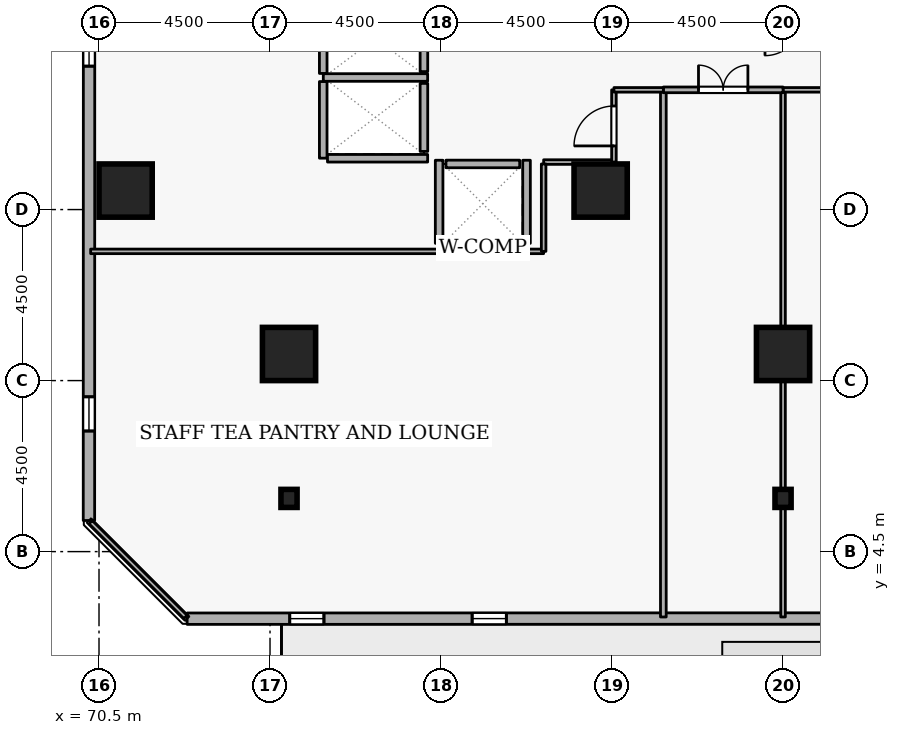
"""IFC4 building model, lengths in metres.
Left out: names, types, materials, properties, quantities, classifications, styles, units other than length and angle.
Written with IfcOpenShell. Run it as: python <this file> out.ifc"""

import sys

from ifc_helpers import new_model, si_unit, direction, frame, frame_2d, origin, origin_2d, place, context, subcontext, project, spatial, rectangle, i_section, extrude, element, fill, save


model = new_model("IFC4")
c1 = context("Model", 3, precision=1e-05, world=origin(), true_north=direction((0.0, 1.0)))
c2 = subcontext(c1, "Body", "Model", "MODEL_VIEW")
j1 = project(units=[si_unit("LENGTHUNIT", "METRE"), si_unit("PLANEANGLEUNIT", "RADIAN")], contexts=[c1])
p1 = place(None, origin())
s1 = spatial("IfcSite", under=j1, at=p1, CompositionType="ELEMENT")
p2 = place(p1, origin())
s2 = spatial("IfcBuilding", under=s1, at=p2, CompositionType="ELEMENT")
p3 = place(p2, frame((0.0, 0.0, 38.7)))
s3 = spatial("IfcBuildingStorey", under=s2, at=p3, CompositionType="ELEMENT", Elevation=38.7)
for number, where, z_axis, x_axis in (
    (1, (71.2, 14.0, 0.0), (0.0, 0.0, 1.0), (1.0, 0.0, 0.0)),
    (2, (88.5, 9.7, 0.0), (0.0, 0.0, 1.0), (1.0, 0.0, 0.0)),
    (3, (75.5, 9.7, 0.0), (0.0, 0.0, 1.0), (1.0, 0.0, 0.0)),
    (4, (83.7, 14.0, 0.0), (0.0, 0.0, 1.0), (1.0, 0.0, 0.0)),
):
    element("IfcColumn", number, at=place(p3, frame(where, z_axis=z_axis, x_axis=x_axis)), inside=s3, PredefinedType="COLUMN", context=c2, shape_type="SweptSolid", body=[
        extrude(rectangle(XDim=1.4, YDim=1.4, at=origin_2d()), origin(), (0.0, 0.0, 1.0), 3.6),
    ])
for number, where, z_axis, x_axis in (
    (5, (88.5, 5.9, 0.0), (0.0, 0.0, 1.0), (1.0, 0.0, 0.0)),
    (6, (75.5, 5.9, 0.0), (0.0, 0.0, 1.0), (1.0, 0.0, 0.0)),
):
    element("IfcColumn", number, at=place(p3, frame(where, z_axis=z_axis, x_axis=x_axis)), inside=s3, PredefinedType="COLUMN", context=c2, shape_type="SweptSolid", body=[
        extrude(i_section(OverallWidth=0.424, OverallDepth=0.475, WebThickness=0.048, FlangeThickness=0.077, FilletRadius=0.015, at=origin_2d()), origin(), (0.0, 0.0, 1.0), 3.6),
    ])
p4 = place(p3, frame((72.819, 2.735, 0.0), z_axis=(0.0, 0.0, 1.0), x_axis=(0.999999969775, 0.000245864205, 0.0)))
e7 = element("IfcWall", 7, at=p4, inside=s3, PredefinedType="STANDARD", context=c2, shape_type="SweptSolid", body=[
    extrude(rectangle(XDim=34.755, YDim=0.3, at=frame_2d((17.377, 0.0))), origin(), (0.0, 0.0, 1.0), 2.7),
])
p5 = place(p4, frame((19.177, 0.0, 0.0)))
e8 = element("IfcOpeningElement", 8, at=p5, cuts=e7, PredefinedType="OPENING", context=c2, shape_type="SweptSolid", body=[
    extrude(rectangle(XDim=1.0, YDim=2.08, at=frame_2d((0.5, 1.04))), frame((0.0, 0.16, 0.0), z_axis=(0.0, -1.0, 0.0), x_axis=(1.0, 0.0, 0.0)), (0.0, 0.0, 1.0), 0.32),
])
p6 = place(p4, frame((2.7, 0.0, 0.72)))
e9 = element("IfcOpeningElement", 9, at=p6, cuts=e7, PredefinedType="OPENING", context=c2, shape_type="SweptSolid", body=[
    extrude(rectangle(XDim=0.9, YDim=1.75, at=frame_2d((0.45, 0.875))), frame((0.0, 0.16, 0.0), z_axis=(0.0, -1.0, 0.0), x_axis=(1.0, 0.0, 0.0)), (0.0, 0.0, 1.0), 0.32),
])
p7 = place(p4, frame((7.5, 0.0, 0.72)))
e10 = element("IfcOpeningElement", 10, at=p7, cuts=e7, PredefinedType="OPENING", context=c2, shape_type="SweptSolid", body=[
    extrude(rectangle(XDim=0.9, YDim=1.75, at=frame_2d((0.45, 0.875))), frame((0.0, 0.16, 0.0), z_axis=(0.0, -1.0, 0.0), x_axis=(1.0, 0.0, 0.0)), (0.0, 0.0, 1.0), 0.32),
])
p8 = place(p4, frame((17.1, 0.0, 0.72)))
e11 = element("IfcOpeningElement", 11, at=p8, cuts=e7, PredefinedType="OPENING", context=c2, shape_type="SweptSolid", body=[
    extrude(rectangle(XDim=0.9, YDim=1.75, at=frame_2d((0.45, 0.875))), frame((0.0, 0.16, 0.0), z_axis=(0.0, -1.0, 0.0), x_axis=(1.0, 0.0, 0.0)), (0.0, 0.0, 1.0), 0.32),
])
p9 = place(p4, frame((21.9, 0.0, 0.72)))
e12 = element("IfcOpeningElement", 12, at=p9, cuts=e7, PredefinedType="OPENING", context=c2, shape_type="SweptSolid", body=[
    extrude(rectangle(XDim=0.9, YDim=1.75, at=frame_2d((0.45, 0.875))), frame((0.0, 0.16, 0.0), z_axis=(0.0, -1.0, 0.0), x_axis=(1.0, 0.0, 0.0)), (0.0, 0.0, 1.0), 0.32),
])
p10 = place(p4, frame((26.7, 0.0, 0.72)))
e13 = element("IfcOpeningElement", 13, at=p10, cuts=e7, PredefinedType="OPENING", context=c2, shape_type="SweptSolid", body=[
    extrude(rectangle(XDim=0.9, YDim=1.75, at=frame_2d((0.45, 0.875))), frame((0.0, 0.16, 0.0), z_axis=(0.0, -1.0, 0.0), x_axis=(1.0, 0.0, 0.0)), (0.0, 0.0, 1.0), 0.32),
])
p11 = place(p3, frame((70.244, 40.073, 0.0), z_axis=(0.0, 0.0, 1.0), x_axis=(-0.000245864205, -0.999999969775, 0.0)))
e14 = element("IfcWall", 14, at=p11, inside=s3, PredefinedType="STANDARD", context=c2, shape_type="SweptSolid", body=[
    extrude(rectangle(XDim=34.755, YDim=0.3, at=frame_2d((17.377, 0.0))), origin(), (0.0, 0.0, 1.0), 2.7),
])
p12 = place(p11, frame((7.5, 0.0, 0.72)))
e15 = element("IfcOpeningElement", 15, at=p12, cuts=e14, PredefinedType="OPENING", context=c2, shape_type="SweptSolid", body=[
    extrude(rectangle(XDim=0.9, YDim=1.75, at=frame_2d((0.45, 0.875))), frame((0.0, 0.16, 0.0), z_axis=(0.0, -1.0, 0.0), x_axis=(1.0, 0.0, 0.0)), (0.0, 0.0, 1.0), 0.32),
])
p13 = place(p11, frame((17.1, 0.0, 0.72)))
e16 = element("IfcOpeningElement", 16, at=p13, cuts=e14, PredefinedType="OPENING", context=c2, shape_type="SweptSolid", body=[
    extrude(rectangle(XDim=0.9, YDim=1.75, at=frame_2d((0.45, 0.875))), frame((0.0, 0.16, 0.0), z_axis=(0.0, -1.0, 0.0), x_axis=(1.0, 0.0, 0.0)), (0.0, 0.0, 1.0), 0.32),
])
p14 = place(p11, frame((21.9, 0.0, 0.72)))
e17 = element("IfcOpeningElement", 17, at=p14, cuts=e14, PredefinedType="OPENING", context=c2, shape_type="SweptSolid", body=[
    extrude(rectangle(XDim=0.9, YDim=1.75, at=frame_2d((0.45, 0.875))), frame((0.0, 0.16, 0.0), z_axis=(0.0, -1.0, 0.0), x_axis=(1.0, 0.0, 0.0)), (0.0, 0.0, 1.0), 0.32),
])
p15 = place(p11, frame((31.5, 0.0, 0.72)))
e18 = element("IfcOpeningElement", 18, at=p15, cuts=e14, PredefinedType="OPENING", context=c2, shape_type="SweptSolid", body=[
    extrude(rectangle(XDim=0.9, YDim=1.75, at=frame_2d((0.45, 0.875))), frame((0.0, 0.16, 0.0), z_axis=(0.0, -1.0, 0.0), x_axis=(1.0, 0.0, 0.0)), (0.0, 0.0, 1.0), 0.32),
])
p16 = place(p3, frame((79.05, 17.13, 0.0), z_axis=(0.0, 0.0, 1.0), x_axis=(0.0, 1.0, 0.0)))
e19 = element("IfcWall", 19, at=p16, inside=s3, PredefinedType="STANDARD", context=c2, shape_type="SweptSolid", body=[
    extrude(rectangle(XDim=1.74, YDim=0.2, at=frame_2d((0.87, 0.0))), origin(), (0.0, 0.0, 1.0), 3.34),
])
p17 = place(p3, frame((79.05, 15.03, 0.0), z_axis=(0.0, 0.0, 1.0), x_axis=(0.0, 1.0, 0.0)))
e20 = element("IfcWall", 20, at=p17, inside=s3, PredefinedType="STANDARD", context=c2, shape_type="SweptSolid", body=[
    extrude(rectangle(XDim=1.79, YDim=0.2, at=frame_2d((0.895, 0.0))), origin(), (0.0, 0.0, 1.0), 3.34),
])
p18 = place(p3, frame((79.63, 14.7, 0.0), z_axis=(0.0, 0.0, 1.0), x_axis=(1.0, 0.0, 0.0)))
e21 = element("IfcWall", 21, at=p18, inside=s3, PredefinedType="STANDARD", context=c2, shape_type="SweptSolid", body=[
    extrude(rectangle(XDim=1.94, YDim=0.2, at=frame_2d((0.97, 0.0))), origin(), (0.0, 0.0, 1.0), 3.34),
])
p19 = place(p3, frame((76.402, 16.975, 0.0), z_axis=(0.0, 0.0, 1.0), x_axis=(1.0, 0.0, 0.0)))
e22 = element("IfcWall", 22, at=p19, inside=s3, PredefinedType="STANDARD", context=c2, shape_type="SweptSolid", body=[
    extrude(rectangle(XDim=2.746, YDim=0.2, at=frame_2d((1.373, 0.0))), origin(), (0.0, 0.0, 1.0), 3.34),
])
p20 = place(p3, frame((76.4, 14.852, 0.0), z_axis=(0.0, 0.0, 1.0), x_axis=(0.0, 1.0, 0.0)))
e23 = element("IfcWall", 23, at=p20, inside=s3, PredefinedType="STANDARD", context=c2, shape_type="SweptSolid", body=[
    extrude(rectangle(XDim=2.016, YDim=0.2, at=frame_2d((1.008, 0.0))), origin(), (0.0, 0.0, 1.0), 3.34),
])
p21 = place(p3, frame((76.4, 17.082, 0.0), z_axis=(0.0, 0.0, 1.0), x_axis=(0.0, 1.0, 0.0)))
e24 = element("IfcWall", 24, at=p21, inside=s3, PredefinedType="STANDARD", context=c2, shape_type="SweptSolid", body=[
    extrude(rectangle(XDim=1.856, YDim=0.2, at=frame_2d((0.928, 0.0))), origin(), (0.0, 0.0, 1.0), 3.34),
])
p22 = place(p3, frame((76.512, 14.85, 0.0), z_axis=(0.0, 0.0, 1.0), x_axis=(1.0, 0.0, 0.0)))
e25 = element("IfcWall", 25, at=p22, inside=s3, PredefinedType="STANDARD", context=c2, shape_type="SweptSolid", body=[
    extrude(rectangle(XDim=2.636, YDim=0.2, at=frame_2d((1.318, 0.0))), origin(), (0.0, 0.0, 1.0), 3.34),
])
p23 = place(p3, frame((79.452, 12.5, 0.0), z_axis=(0.0, 0.0, 1.0), x_axis=(1.0, 0.0, 0.0)))
e26 = element("IfcWall", 26, at=p23, inside=s3, PredefinedType="STANDARD", context=c2, shape_type="SweptSolid", body=[
    extrude(rectangle(XDim=2.296, YDim=0.2, at=frame_2d((1.148, 0.0))), origin(), (0.0, 0.0, 1.0), 3.34),
])
for number, where, z_axis, x_axis in (
    (27, (81.75, 12.612, 0.0), (0.0, 0.0, 1.0), (0.0, 1.0, 0.0)),
    (28, (79.45, 12.612, 0.0), (0.0, 0.0, 1.0), (0.0, 1.0, 0.0)),
):
    element("IfcWall", number, at=place(p3, frame(where, z_axis=z_axis, x_axis=x_axis)), inside=s3, PredefinedType="STANDARD", context=c2, shape_type="SweptSolid", body=[
        extrude(rectangle(XDim=2.186, YDim=0.2, at=frame_2d((1.093, 0.0))), origin(), (0.0, 0.0, 1.0), 3.34),
    ])
p24 = place(p3, frame((88.5, 2.78, 0.0), z_axis=(0.0, 0.0, 1.0), x_axis=(0.0, 1.0, 0.0)))
e29 = element("IfcWall", 29, at=p24, inside=s3, PredefinedType="PARTITIONING", context=c2, shape_type="SweptSolid", body=[
    extrude(rectangle(XDim=13.87, YDim=0.12, at=frame_2d((6.935, 0.0))), origin(), (0.0, 0.0, 1.0), 2.882),
])
p25 = place(p3, frame((88.5, 16.65, 0.0), z_axis=(0.0, 0.0, 1.0), x_axis=(1.0, 0.0, 0.0)))
e30 = element("IfcWall", 30, at=p25, inside=s3, PredefinedType="PARTITIONING", context=c2, shape_type="SweptSolid", body=[
    extrude(rectangle(XDim=4.45, YDim=0.12, at=frame_2d((2.225, 0.0))), origin(), (0.0, 0.0, 1.0), 3.34),
])
p26 = place(p3, frame((85.35, 2.78, 0.0), z_axis=(0.0, 0.0, 1.0), x_axis=(0.0, 1.0, 0.0)))
e31 = element("IfcWall", 31, at=p26, inside=s3, PredefinedType="PARTITIONING", context=c2, shape_type="SweptSolid", body=[
    extrude(rectangle(XDim=13.87, YDim=0.15, at=frame_2d((6.935, 0.0))), origin(), (0.0, 0.0, 1.0), 3.34),
])
p27 = place(p3, frame((85.35, 16.65, 0.0), z_axis=(0.0, 0.0, 1.0), x_axis=(1.0, 0.0, 0.0)))
e32 = element("IfcWall", 32, at=p27, inside=s3, PredefinedType="PARTITIONING", context=c2, shape_type="SweptSolid", body=[
    extrude(rectangle(XDim=3.15, YDim=0.15, at=frame_2d((1.575, 0.0))), origin(), (0.0, 0.0, 1.0), 3.34),
])
p28 = place(p27, frame((0.925, 0.0, 0.0)))
e33 = element("IfcOpeningElement", 33, at=p28, cuts=e32, PredefinedType="OPENING", context=c2, shape_type="SweptSolid", body=[
    extrude(rectangle(XDim=1.3, YDim=2.12, at=frame_2d((0.65, 1.06))), frame((0.0, 0.085, 0.0), z_axis=(0.0, -1.0, 0.0), x_axis=(1.0, 0.0, 0.0)), (0.0, 0.0, 1.0), 0.17),
])
p29 = place(p3, frame((82.2, 14.75, 0.0), z_axis=(0.0, 0.0, 1.0), x_axis=(1.0, 0.0, 0.0)))
e34 = element("IfcWall", 34, at=p29, inside=s3, PredefinedType="PARTITIONING", context=c2, shape_type="SweptSolid", body=[
    extrude(rectangle(XDim=1.85, YDim=0.12, at=frame_2d((0.925, 0.0))), origin(), (0.0, 0.0, 1.0), 3.34),
])
p30 = place(p3, frame((84.05, 14.75, 0.0), z_axis=(0.0, 0.0, 1.0), x_axis=(0.0, 1.0, 0.0)))
e35 = element("IfcWall", 35, at=p30, inside=s3, PredefinedType="PARTITIONING", context=c2, shape_type="SweptSolid", body=[
    extrude(rectangle(XDim=1.9, YDim=0.12, at=frame_2d((0.95, 0.0))), origin(), (0.0, 0.0, 1.0), 3.34),
])
p31 = place(p30, frame((0.425, 0.0, 0.0)))
e36 = element("IfcOpeningElement", 36, at=p31, cuts=e35, PredefinedType="OPENING", context=c2, shape_type="SweptSolid", body=[
    extrude(rectangle(XDim=1.05, YDim=2.1, at=frame_2d((0.525, 1.05))), frame((0.0, 0.07, 0.0), z_axis=(0.0, -1.0, 0.0), x_axis=(1.0, 0.0, 0.0)), (0.0, 0.0, 1.0), 0.14),
])
p32 = place(p3, frame((84.05, 16.65, 0.0), z_axis=(0.0, 0.0, 1.0), x_axis=(1.0, 0.0, 0.0)))
e37 = element("IfcWall", 37, at=p32, inside=s3, PredefinedType="PARTITIONING", context=c2, shape_type="SweptSolid", body=[
    extrude(rectangle(XDim=1.3, YDim=0.12, at=frame_2d((0.65, 0.0))), origin(), (0.0, 0.0, 1.0), 3.34),
])
p33 = place(p3, frame((72.775, 2.78, 0.0), z_axis=(0.0, 0.0, 1.0), x_axis=(-0.707106781187, 0.707106781187, 0.0)))
e38 = element("IfcWall", 38, at=p33, inside=s3, PredefinedType="PARTITIONING", context=c2, shape_type="SweptSolid", body=[
    extrude(rectangle(XDim=3.528, YDim=0.12, at=frame_2d((1.764, 0.0))), origin(), (0.0, 0.0, 1.0), 3.34),
])
p34 = place(p3, frame((70.28, 12.4, 0.0), z_axis=(0.0, 0.0, 1.0), x_axis=(1.0, 0.0, 0.0)))
e39 = element("IfcWall", 39, at=p34, inside=s3, PredefinedType="PARTITIONING", context=c2, shape_type="SweptSolid", body=[
    extrude(rectangle(XDim=9.172, YDim=0.12, at=frame_2d((4.586, 0.0))), origin(), (0.0, 0.0, 1.0), 3.34),
])
p35 = place(p3, frame((81.748, 12.4, 0.0), z_axis=(0.0, 0.0, 1.0), x_axis=(1.0, 0.0, 0.0)))
e40 = element("IfcWall", 40, at=p35, inside=s3, PredefinedType="PARTITIONING", context=c2, shape_type="SweptSolid", body=[
    extrude(rectangle(XDim=0.452, YDim=0.12, at=frame_2d((0.226, 0.0))), origin(), (0.0, 0.0, 1.0), 3.34),
])
p36 = place(p3, frame((82.2, 12.4, 0.0), z_axis=(0.0, 0.0, 1.0), x_axis=(0.0, 1.0, 0.0)))
e41 = element("IfcWall", 41, at=p36, inside=s3, PredefinedType="PARTITIONING", context=c2, shape_type="SweptSolid", body=[
    extrude(rectangle(XDim=2.3, YDim=0.12, at=frame_2d((1.15, 0.0))), origin(), (0.0, 0.0, 1.0), 3.34),
])
p37 = place(p6, origin())
e42 = element("IfcWindow", 42, at=p37, inside=s3, PartitioningType="SINGLE_PANEL", PredefinedType="WINDOW", context=c2, shape_type="SweptSolid", body=[
    extrude(rectangle(XDim=0.9, YDim=1.75, at=frame_2d((0.45, 0.875))), frame((0.0, 0.03, 0.0), z_axis=(0.0, -1.0, 0.0), x_axis=(1.0, 0.0, 0.0)), (0.0, 0.0, 1.0), 0.06),
])
fill(e9, e42)
p38 = place(p7, origin())
e43 = element("IfcWindow", 43, at=p38, inside=s3, PartitioningType="SINGLE_PANEL", PredefinedType="WINDOW", context=c2, shape_type="SweptSolid", body=[
    extrude(rectangle(XDim=0.9, YDim=1.75, at=frame_2d((0.45, 0.875))), frame((0.0, 0.03, 0.0), z_axis=(0.0, -1.0, 0.0), x_axis=(1.0, 0.0, 0.0)), (0.0, 0.0, 1.0), 0.06),
])
fill(e10, e43)
p39 = place(p14, origin())
e44 = element("IfcWindow", 44, at=p39, inside=s3, PartitioningType="SINGLE_PANEL", PredefinedType="WINDOW", context=c2, shape_type="SweptSolid", body=[
    extrude(rectangle(XDim=0.9, YDim=1.75, at=frame_2d((0.45, 0.875))), frame((0.0, 0.03, 0.0), z_axis=(0.0, -1.0, 0.0), x_axis=(1.0, 0.0, 0.0)), (0.0, 0.0, 1.0), 0.06),
])
fill(e17, e44)
p40 = place(p15, origin())
e45 = element("IfcWindow", 45, at=p40, inside=s3, PartitioningType="SINGLE_PANEL", PredefinedType="WINDOW", context=c2, shape_type="SweptSolid", body=[
    extrude(rectangle(XDim=0.9, YDim=1.75, at=frame_2d((0.45, 0.875))), frame((0.0, 0.03, 0.0), z_axis=(0.0, -1.0, 0.0), x_axis=(1.0, 0.0, 0.0)), (0.0, 0.0, 1.0), 0.06),
])
fill(e18, e45)
p41 = place(p28, origin())
e46 = element("IfcDoor", 46, at=p41, inside=s3, OperationType="DOUBLE_DOOR_SINGLE_SWING", PredefinedType="DOOR", context=c2, shape_type="SweptSolid", body=[
    extrude(rectangle(XDim=1.3, YDim=2.12, at=frame_2d((0.65, 1.06))), frame((0.0, 0.025, 0.0), z_axis=(0.0, -1.0, 0.0), x_axis=(1.0, 0.0, 0.0)), (0.0, 0.0, 1.0), 0.05),
])
fill(e33, e46)
p42 = place(p31, origin())
e47 = element("IfcDoor", 47, at=p42, inside=s3, OperationType="SINGLE_SWING_LEFT", PredefinedType="DOOR", context=c2, shape_type="SweptSolid", body=[
    extrude(rectangle(XDim=1.05, YDim=2.1, at=frame_2d((0.525, 1.05))), frame((0.0, 0.025, 0.0), z_axis=(0.0, -1.0, 0.0), x_axis=(1.0, 0.0, 0.0)), (0.0, 0.0, 1.0), 0.05),
])
fill(e36, e47)
save(model, sys.argv[1])
